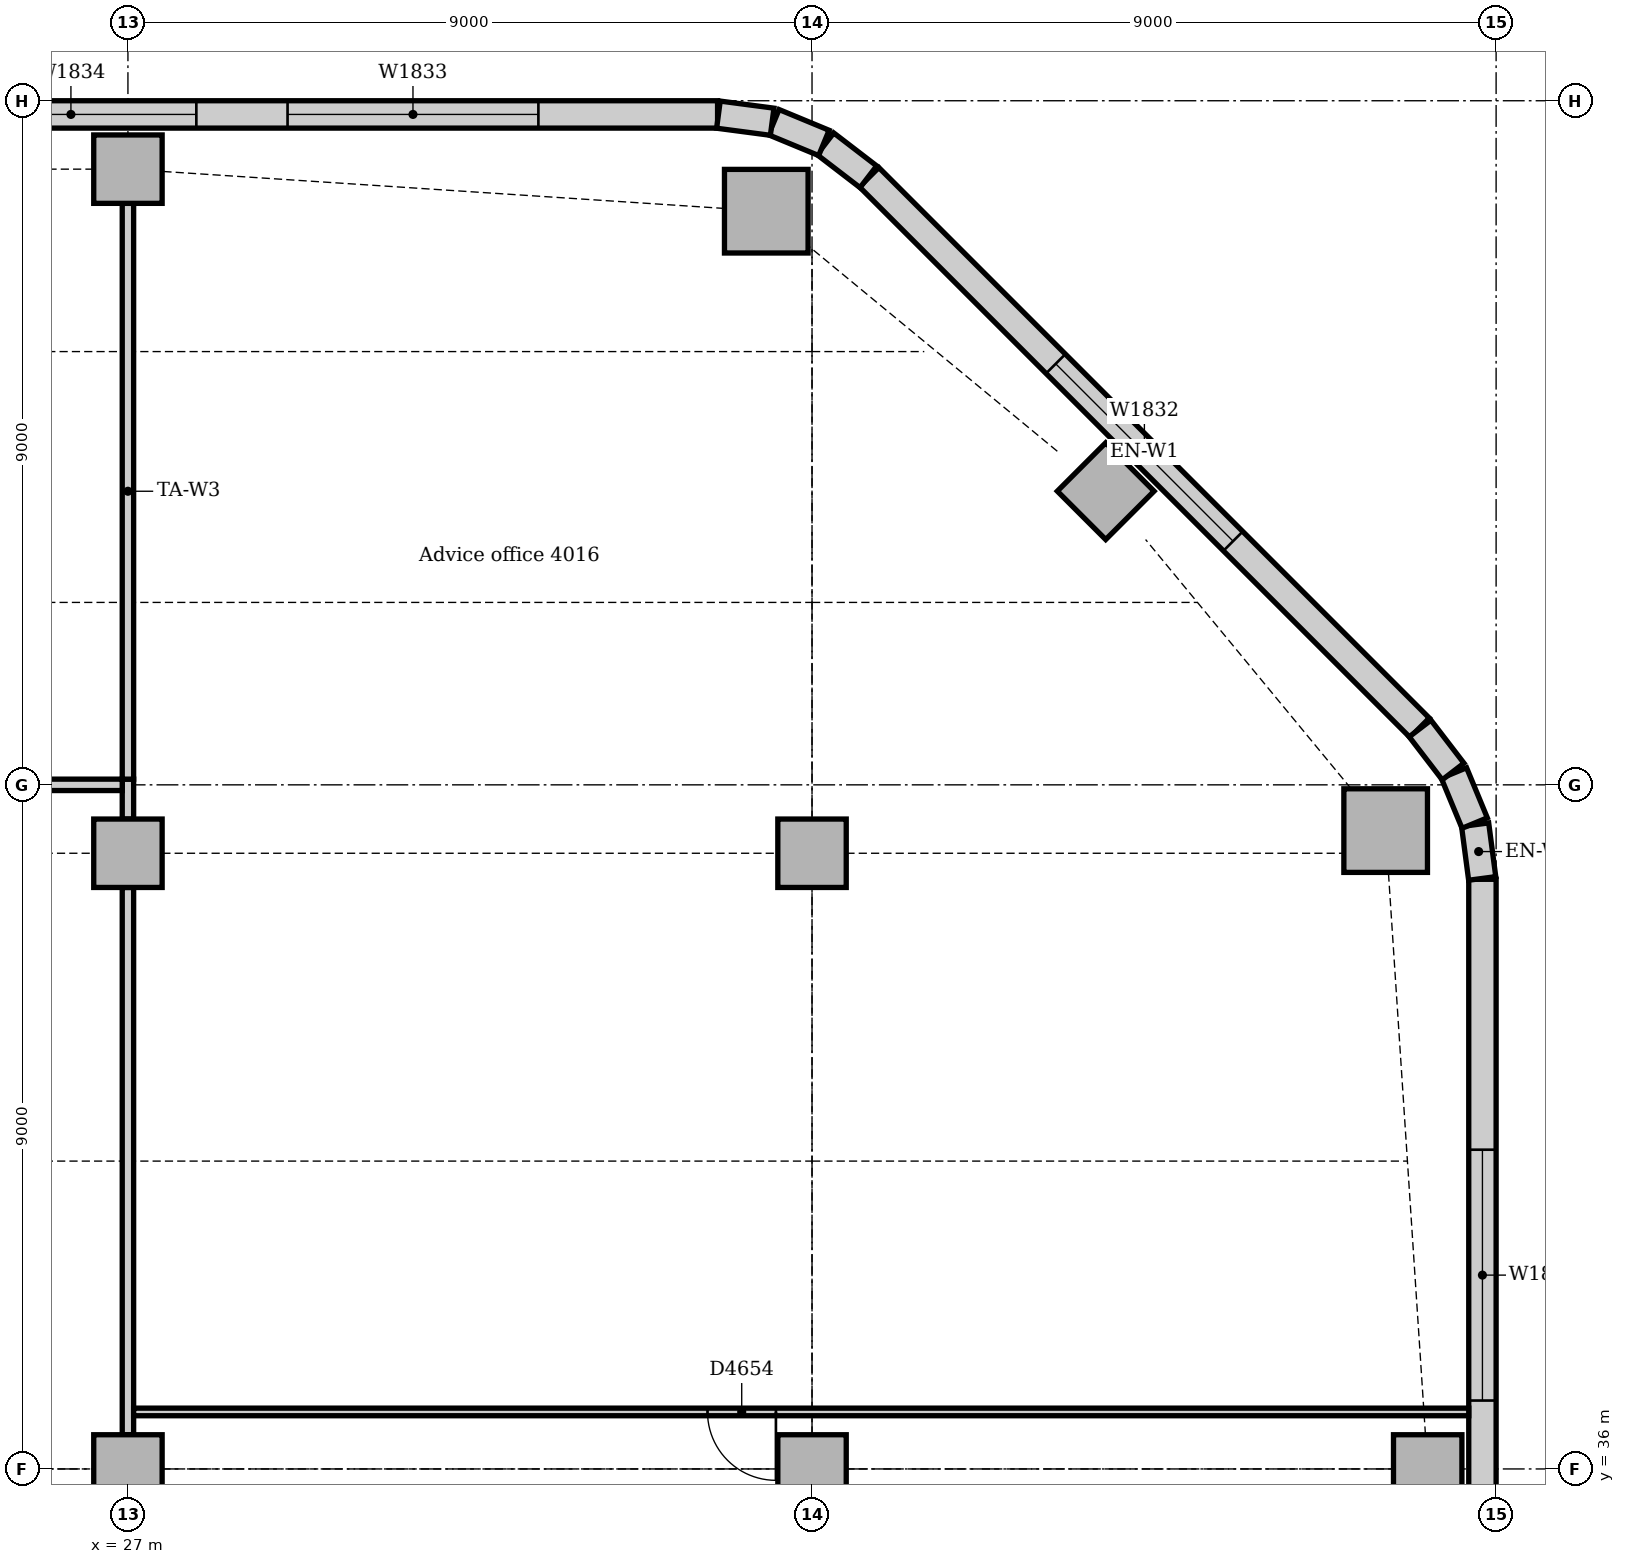
"""IFC4 building model, lengths in metres.
Left out: names, types, materials, properties, quantities, classifications, styles, units other than length and angle.
Written with IfcOpenShell. Run it as: python <this file> out.ifc"""

import sys

from ifc_helpers import new_model, si_unit, direction, frame, frame_2d, origin, origin_2d, place, context, subcontext, project, spatial, rectangle, extrude, element, fill, save


model = new_model("IFC4")
c1 = context("Model", 3, precision=1e-05, world=origin(), true_north=direction((0.0, 1.0)))
c2 = subcontext(c1, "Body", "Model", "MODEL_VIEW")
j1 = project(units=[si_unit("LENGTHUNIT", "METRE"), si_unit("PLANEANGLEUNIT", "RADIAN")], contexts=[c1])
p1 = place(None, origin())
s1 = spatial("IfcSite", under=j1, at=p1, CompositionType="ELEMENT")
p2 = place(p1, origin())
s2 = spatial("IfcBuilding", under=s1, at=p2, CompositionType="ELEMENT")
p3 = place(p2, frame((0.0, 0.0, 169.0)))
s3 = spatial("IfcBuildingStorey", under=s2, at=p3, CompositionType="ELEMENT", Elevation=169.0)
for number, where, z_axis, x_axis in (
    (1, (43.547, 44.398, 0.0), (0.0, 0.0, 1.0), (1.0, 0.0, 0.0)),
    (2, (35.398, 52.547, 0.0), (0.0, 0.0, 1.0), (1.0, 0.0, 0.0)),
):
    element("IfcColumn", number, at=place(p3, frame(where, z_axis=z_axis, x_axis=x_axis)), inside=s3, PredefinedType="COLUMN", context=c2, shape_type="SweptSolid", body=[
        extrude(rectangle(XDim=1.1, YDim=1.1, at=origin_2d()), origin(), (0.0, 0.0, 1.0), 3.85),
    ])
for number, where, z_axis, x_axis in (
    (3, (44.1, 36.0, 0.0), (0.0, 0.0, 1.0), (1.0, 0.0, 0.0)),
    (4, (39.864, 48.864, 0.0), (0.0, 0.0, 1.0), (0.707, 0.707, 0.0)),
    (5, (27.0, 53.1, 0.0), (0.0, 0.0, 1.0), (1.0, 0.0, 0.0)),
    (6, (27.0, 36.0, 0.0), (0.0, 0.0, 1.0), (1.0, 0.0, 0.0)),
    (7, (27.0, 44.1, 0.0), (0.0, 0.0, 1.0), (1.0, 0.0, 0.0)),
    (8, (36.0, 36.0, 0.0), (0.0, 0.0, 1.0), (1.0, 0.0, 0.0)),
    (9, (36.0, 44.1, 0.0), (0.0, 0.0, 1.0), (1.0, 0.0, 0.0)),
):
    element("IfcColumn", number, at=place(p3, frame(where, z_axis=z_axis, x_axis=x_axis)), inside=s3, PredefinedType="COLUMN", context=c2, shape_type="SweptSolid", body=[
        extrude(rectangle(XDim=0.9, YDim=0.9, at=origin_2d()), origin(), (0.0, 0.0, 1.0), 3.85),
    ])
p4 = place(p3, frame((44.82, 19.243, 0.0), z_axis=(0.0, 0.0, 1.0), x_axis=(0.0, 1.0, 0.0)))
e10 = element("IfcWall", 10, at=p4, inside=s3, PredefinedType="STANDARD", context=c2, shape_type="SweptSolid", body=[
    extrude(rectangle(XDim=24.515, YDim=0.36, at=frame_2d((12.257, 0.0))), origin(), (0.0, 0.0, 1.0), 3.85),
])
p5 = place(p4, frame((3.857, 0.0, 0.9)))
e11 = element("IfcOpeningElement", 11, at=p5, cuts=e10, PredefinedType="OPENING", context=c2, shape_type="SweptSolid", body=[
    extrude(rectangle(XDim=3.3, YDim=1.6, at=frame_2d((1.65, 0.8))), frame((0.0, 0.19, 0.0), z_axis=(0.0, -1.0, 0.0), x_axis=(1.0, 0.0, 0.0)), (0.0, 0.0, 1.0), 0.38),
])
p6 = place(p4, frame((8.357, 0.0, 0.9)))
e12 = element("IfcOpeningElement", 12, at=p6, cuts=e10, PredefinedType="OPENING", context=c2, shape_type="SweptSolid", body=[
    extrude(rectangle(XDim=3.3, YDim=1.6, at=frame_2d((1.65, 0.8))), frame((0.0, 0.19, 0.0), z_axis=(0.0, -1.0, 0.0), x_axis=(1.0, 0.0, 0.0)), (0.0, 0.0, 1.0), 0.38),
])
p7 = place(p4, frame((12.857, 0.0, 0.9)))
e13 = element("IfcOpeningElement", 13, at=p7, cuts=e10, PredefinedType="OPENING", context=c2, shape_type="SweptSolid", body=[
    extrude(rectangle(XDim=3.3, YDim=1.6, at=frame_2d((1.65, 0.8))), frame((0.0, 0.19, 0.0), z_axis=(0.0, -1.0, 0.0), x_axis=(1.0, 0.0, 0.0)), (0.0, 0.0, 1.0), 0.38),
])
p8 = place(p4, frame((17.657, 0.0, 0.9)))
e14 = element("IfcOpeningElement", 14, at=p8, cuts=e10, PredefinedType="OPENING", context=c2, shape_type="SweptSolid", body=[
    extrude(rectangle(XDim=3.3, YDim=1.6, at=frame_2d((1.65, 0.8))), frame((0.0, 0.19, 0.0), z_axis=(0.0, -1.0, 0.0), x_axis=(1.0, 0.0, 0.0)), (0.0, 0.0, 1.0), 0.38),
])
p9 = place(p3, frame((43.994, 45.751, 0.0), z_axis=(0.0, 0.0, 1.0), x_axis=(-0.707106781187, 0.707106781187, 0.0)))
e15 = element("IfcWall", 15, at=p9, inside=s3, PredefinedType="STANDARD", context=c2, shape_type="SweptSolid", body=[
    extrude(rectangle(XDim=10.243, YDim=0.36, at=frame_2d((5.121, 0.0))), origin(), (0.0, 0.0, 1.0), 3.85),
])
p10 = place(p9, frame((3.471, 0.0, 0.9)))
e16 = element("IfcOpeningElement", 16, at=p10, cuts=e15, PredefinedType="OPENING", context=c2, shape_type="SweptSolid", body=[
    extrude(rectangle(XDim=3.3, YDim=1.6, at=frame_2d((1.65, 0.8))), frame((0.0, 0.19, 0.0), z_axis=(0.0, -1.0, 0.0), x_axis=(1.0, 0.0, 0.0)), (0.0, 0.0, 1.0), 0.38),
])
p11 = place(p3, frame((34.757, 53.82, 0.0), z_axis=(0.0, 0.0, 1.0), x_axis=(-1.0, 0.0, 0.0)))
e17 = element("IfcWall", 17, at=p11, inside=s3, PredefinedType="STANDARD", context=c2, shape_type="SweptSolid", body=[
    extrude(rectangle(XDim=30.515, YDim=0.36, at=frame_2d((15.257, 0.0))), origin(), (0.0, 0.0, 1.0), 3.85),
])
p12 = place(p11, frame((2.357, 0.0, 0.9)))
e18 = element("IfcOpeningElement", 18, at=p12, cuts=e17, PredefinedType="OPENING", context=c2, shape_type="SweptSolid", body=[
    extrude(rectangle(XDim=3.3, YDim=1.6, at=frame_2d((1.65, 0.8))), frame((0.0, 0.19, 0.0), z_axis=(0.0, -1.0, 0.0), x_axis=(1.0, 0.0, 0.0)), (0.0, 0.0, 1.0), 0.38),
])
p13 = place(p11, frame((6.857, 0.0, 0.9)))
e19 = element("IfcOpeningElement", 19, at=p13, cuts=e17, PredefinedType="OPENING", context=c2, shape_type="SweptSolid", body=[
    extrude(rectangle(XDim=3.3, YDim=1.6, at=frame_2d((1.65, 0.8))), frame((0.0, 0.19, 0.0), z_axis=(0.0, -1.0, 0.0), x_axis=(1.0, 0.0, 0.0)), (0.0, 0.0, 1.0), 0.38),
])
p14 = place(p11, frame((11.357, 0.0, 0.9)))
e20 = element("IfcOpeningElement", 20, at=p14, cuts=e17, PredefinedType="OPENING", context=c2, shape_type="SweptSolid", body=[
    extrude(rectangle(XDim=3.3, YDim=1.6, at=frame_2d((1.65, 0.8))), frame((0.0, 0.19, 0.0), z_axis=(0.0, -1.0, 0.0), x_axis=(1.0, 0.0, 0.0)), (0.0, 0.0, 1.0), 0.38),
])
p15 = place(p11, frame((15.857, 0.0, 0.9)))
e21 = element("IfcOpeningElement", 21, at=p15, cuts=e17, PredefinedType="OPENING", context=c2, shape_type="SweptSolid", body=[
    extrude(rectangle(XDim=3.3, YDim=1.6, at=frame_2d((1.65, 0.8))), frame((0.0, 0.19, 0.0), z_axis=(0.0, -1.0, 0.0), x_axis=(1.0, 0.0, 0.0)), (0.0, 0.0, 1.0), 0.38),
])
p16 = place(p11, frame((20.357, 0.0, 0.9)))
e22 = element("IfcOpeningElement", 22, at=p16, cuts=e17, PredefinedType="OPENING", context=c2, shape_type="SweptSolid", body=[
    extrude(rectangle(XDim=3.3, YDim=1.6, at=frame_2d((1.65, 0.8))), frame((0.0, 0.19, 0.0), z_axis=(0.0, -1.0, 0.0), x_axis=(1.0, 0.0, 0.0)), (0.0, 0.0, 1.0), 0.38),
])
p17 = place(p11, frame((24.857, 0.0, 0.9)))
e23 = element("IfcOpeningElement", 23, at=p17, cuts=e17, PredefinedType="OPENING", context=c2, shape_type="SweptSolid", body=[
    extrude(rectangle(XDim=3.3, YDim=1.6, at=frame_2d((1.65, 0.8))), frame((0.0, 0.19, 0.0), z_axis=(0.0, -1.0, 0.0), x_axis=(1.0, 0.0, 0.0)), (0.0, 0.0, 1.0), 0.38),
])
for number, where, z_axis, x_axis in (
    (24, (44.817, 43.769, 0.0), (0.0, 0.0, 1.0), (-0.131, 0.991, 0.0)),
    (25, (44.718, 44.497, 0.0), (0.0, 0.0, 1.0), (-0.383, 0.924, 0.0)),
):
    element("IfcWall", number, at=place(p3, frame(where, z_axis=z_axis, x_axis=x_axis)), inside=s3, PredefinedType="STANDARD", context=c2, shape_type="SweptSolid", body=[
        extrude(rectangle(XDim=0.713, YDim=0.36, at=frame_2d((0.356, 0.0))), origin(), (0.0, 0.0, 1.0), 3.85),
    ])
for number, where, z_axis, x_axis in (
    (26, (44.434, 45.175, 0.0), (0.0, 0.0, 1.0), (-0.609, 0.793, 0.0)),
    (27, (36.741, 53.0, 0.0), (0.0, 0.0, 1.0), (-0.793, 0.609, 0.0)),
):
    element("IfcWall", number, at=place(p3, frame(where, z_axis=z_axis, x_axis=x_axis)), inside=s3, PredefinedType="STANDARD", context=c2, shape_type="SweptSolid", body=[
        extrude(rectangle(XDim=0.713, YDim=0.36, at=frame_2d((0.357, 0.0))), origin(), (0.0, 0.0, 1.0), 3.85),
    ])
for number, where, z_axis, x_axis in (
    (28, (36.156, 53.445, 0.0), (0.0, 0.0, 1.0), (-0.924, 0.383, 0.0)),
    (29, (35.476, 53.724, 0.0), (0.0, 0.0, 1.0), (-0.991, 0.131, 0.0)),
):
    element("IfcWall", number, at=place(p3, frame(where, z_axis=z_axis, x_axis=x_axis)), inside=s3, PredefinedType="STANDARD", context=c2, shape_type="SweptSolid", body=[
        extrude(rectangle(XDim=0.713, YDim=0.36, at=frame_2d((0.356, 0.0))), origin(), (0.0, 0.0, 1.0), 3.85),
    ])
p18 = place(p3, frame((27.0, 36.45, 0.0), z_axis=(0.0, 0.0, 1.0), x_axis=(0.0, 1.0, 0.0)))
e30 = element("IfcWall", 30, at=p18, inside=s3, PredefinedType="PARTITIONING", context=c2, shape_type="SweptSolid", body=[
    extrude(rectangle(XDim=7.2, YDim=0.15, at=frame_2d((3.6, 0.0))), origin(), (0.0, 0.0, 1.0), 3.362),
])
p19 = place(p3, frame((27.0, 44.55, 0.0), z_axis=(0.0, 0.0, 1.0), x_axis=(0.0, 1.0, 0.0)))
e31 = element("IfcWall", 31, at=p19, inside=s3, PredefinedType="PARTITIONING", context=c2, shape_type="SweptSolid", body=[
    extrude(rectangle(XDim=0.525, YDim=0.15, at=frame_2d((0.263, 0.0))), origin(), (0.0, 0.0, 1.0), 3.362),
])
p20 = place(p3, frame((22.425, 45.0, 0.0), z_axis=(0.0, 0.0, 1.0), x_axis=(1.0, 0.0, 0.0)))
e32 = element("IfcWall", 32, at=p20, inside=s3, PredefinedType="PARTITIONING", context=c2, shape_type="SweptSolid", body=[
    extrude(rectangle(XDim=4.5, YDim=0.15, at=frame_2d((2.25, 0.0))), origin(), (0.0, 0.0, 1.0), 3.85),
])
p21 = place(p20, frame((1.75, 0.0, 0.0)))
e33 = element("IfcOpeningElement", 33, at=p21, cuts=e32, PredefinedType="OPENING", context=c2, shape_type="SweptSolid", body=[
    extrude(rectangle(XDim=1.0, YDim=2.1, at=frame_2d((0.5, 1.05))), frame((0.0, 0.085, 0.0), z_axis=(0.0, -1.0, 0.0), x_axis=(1.0, 0.0, 0.0)), (0.0, 0.0, 1.0), 0.17),
])
p22 = place(p3, frame((27.0, 45.075, 0.0), z_axis=(0.0, 0.0, 1.0), x_axis=(0.0, 1.0, 0.0)))
e34 = element("IfcWall", 34, at=p22, inside=s3, PredefinedType="PARTITIONING", context=c2, shape_type="SweptSolid", body=[
    extrude(rectangle(XDim=7.575, YDim=0.15, at=frame_2d((3.788, 0.0))), origin(), (0.0, 0.0, 1.0), 3.362),
])
p23 = place(p3, frame((27.075, 36.75, 0.0), z_axis=(0.0, 0.0, 1.0), x_axis=(1.0, 0.0, 0.0)))
e35 = element("IfcWall", 35, at=p23, inside=s3, PredefinedType="PARTITIONING", context=c2, shape_type="SweptSolid", body=[
    extrude(rectangle(XDim=17.565, YDim=0.1, at=frame_2d((8.783, 0.0))), origin(), (0.0, 0.0, 1.0), 3.85),
])
p24 = place(p23, frame((7.55, 0.0, 0.0)))
e36 = element("IfcOpeningElement", 36, at=p24, cuts=e35, PredefinedType="OPENING", context=c2, shape_type="SweptSolid", body=[
    extrude(rectangle(XDim=0.9, YDim=2.1, at=frame_2d((0.45, 1.05))), frame((0.0, 0.06, 0.0), z_axis=(0.0, -1.0, 0.0), x_axis=(1.0, 0.0, 0.0)), (0.0, 0.0, 1.0), 0.12),
])
p25 = place(p8, origin())
e37 = element("IfcWindow", 37, at=p25, inside=s3, PartitioningType="SINGLE_PANEL", PredefinedType="WINDOW", context=c2, shape_type="SweptSolid", body=[
    extrude(rectangle(XDim=3.3, YDim=1.6, at=frame_2d((1.65, 0.8))), frame((0.0, 0.13, 0.0), z_axis=(0.0, -1.0, 0.0), x_axis=(1.0, 0.0, 0.0)), (0.0, 0.0, 1.0), 0.06),
])
fill(e14, e37)
p26 = place(p10, origin())
e38 = element("IfcWindow", 38, at=p26, inside=s3, PartitioningType="SINGLE_PANEL", PredefinedType="WINDOW", context=c2, shape_type="SweptSolid", body=[
    extrude(rectangle(XDim=3.3, YDim=1.6, at=frame_2d((1.65, 0.8))), frame((0.0, 0.13, 0.0), z_axis=(0.0, -1.0, 0.0), x_axis=(1.0, 0.0, 0.0)), (0.0, 0.0, 1.0), 0.06),
])
fill(e16, e38)
p27 = place(p12, origin())
e39 = element("IfcWindow", 39, at=p27, inside=s3, PartitioningType="SINGLE_PANEL", PredefinedType="WINDOW", context=c2, shape_type="SweptSolid", body=[
    extrude(rectangle(XDim=3.3, YDim=1.6, at=frame_2d((1.65, 0.8))), frame((0.0, 0.13, 0.0), z_axis=(0.0, -1.0, 0.0), x_axis=(1.0, 0.0, 0.0)), (0.0, 0.0, 1.0), 0.06),
])
fill(e18, e39)
p28 = place(p13, origin())
e40 = element("IfcWindow", 40, at=p28, inside=s3, PartitioningType="SINGLE_PANEL", PredefinedType="WINDOW", context=c2, shape_type="SweptSolid", body=[
    extrude(rectangle(XDim=3.3, YDim=1.6, at=frame_2d((1.65, 0.8))), frame((0.0, 0.13, 0.0), z_axis=(0.0, -1.0, 0.0), x_axis=(1.0, 0.0, 0.0)), (0.0, 0.0, 1.0), 0.06),
])
fill(e19, e40)
p29 = place(p24, frame((0.9, 0.0, 0.0), z_axis=(0.0, 0.0, 1.0), x_axis=(-1.0, 0.0, 0.0)))
e41 = element("IfcDoor", 41, at=p29, inside=s3, OperationType="SINGLE_SWING_LEFT", PredefinedType="DOOR", context=c2, shape_type="SweptSolid", body=[
    extrude(rectangle(XDim=0.9, YDim=2.1, at=frame_2d((0.45, 1.05))), frame((0.0, 0.025, 0.0), z_axis=(0.0, -1.0, 0.0), x_axis=(1.0, 0.0, 0.0)), (0.0, 0.0, 1.0), 0.05),
])
fill(e36, e41)
save(model, sys.argv[1])
